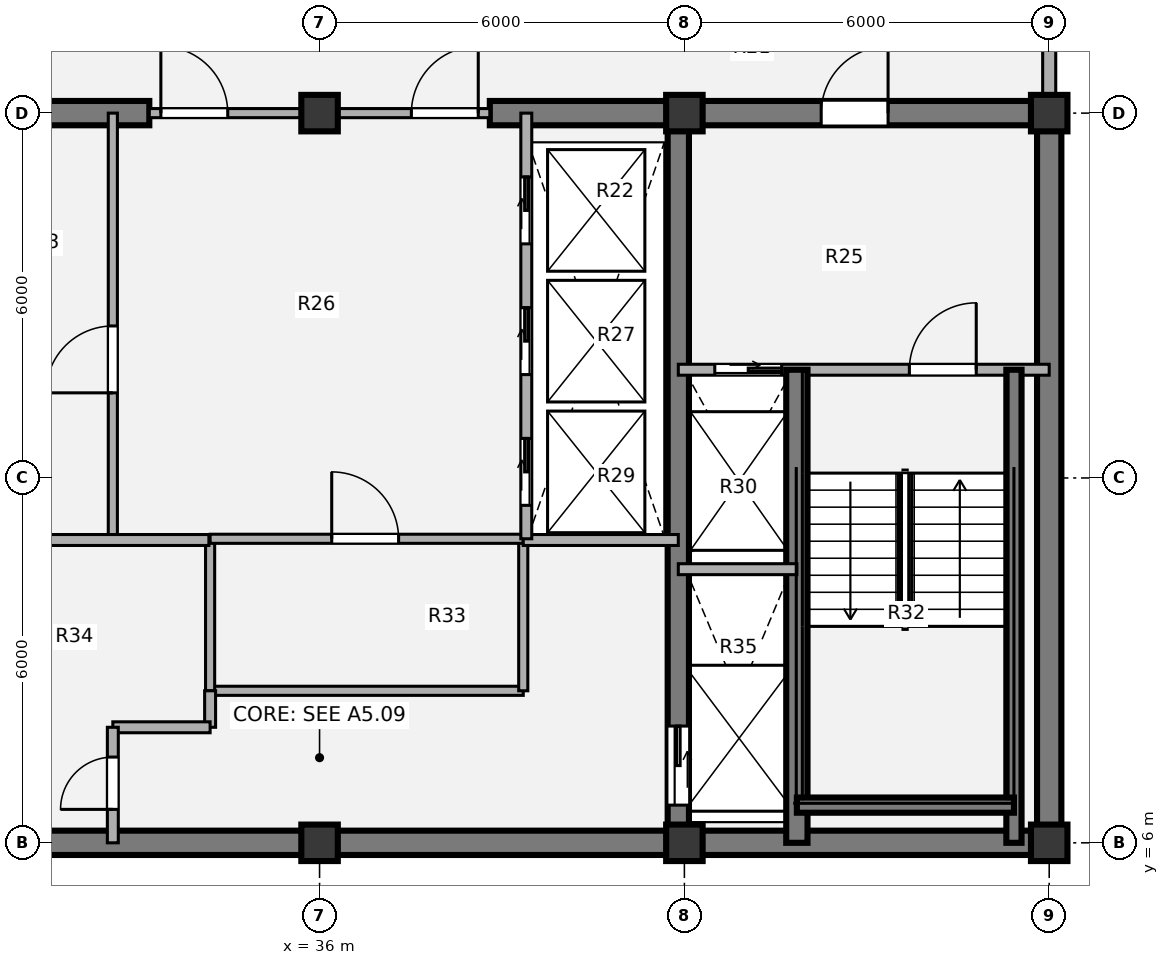
"""IFC4 building model, lengths in metres.
Left out: names, types, materials, properties, quantities, classifications, styles, units other than length and angle.
Written with IfcOpenShell. Run it as: python <this file> out.ifc"""

import sys

from ifc_helpers import new_model, si_unit, direction, frame, frame_2d, origin, origin_2d, place, context, subcontext, project, spatial, rectangle, extrude, source, transform, mapped, element, fill, save


model = new_model("IFC4")
c1 = context("Model", 3, precision=1e-05, world=origin(), true_north=direction((0.0, 1.0)))
c2 = subcontext(c1, "Body", "Model", "MODEL_VIEW")
j1 = project(units=[si_unit("LENGTHUNIT", "METRE"), si_unit("PLANEANGLEUNIT", "RADIAN")], contexts=[c1])
p1 = place(None, origin())
s1 = spatial("IfcSite", under=j1, at=p1, CompositionType="ELEMENT")
p2 = place(p1, origin())
s2 = spatial("IfcBuilding", under=s1, at=p2, CompositionType="ELEMENT")
p3 = place(p2, frame((0.0, 0.0, 275.94)))
s3 = spatial("IfcBuildingStorey", under=s2, at=p3, CompositionType="ELEMENT", Elevation=275.94)
m1 = source(origin(), c2, "Body", "SweptSolid", [
    extrude(rectangle(XDim=0.6, YDim=0.6, at=origin_2d()), origin(), (0.0, 0.0, 1.0), 3.78),
])
for number, where, z_axis, x_axis in (
    (1, (36.0, 6.0, 0.0), (0.0, 0.0, 1.0), (1.0, 0.0, 0.0)),
    (2, (42.0, 6.0, 0.0), (0.0, 0.0, 1.0), (1.0, 0.0, 0.0)),
    (3, (48.0, 6.0, 0.0), (0.0, 0.0, 1.0), (1.0, 0.0, 0.0)),
    (4, (36.0, 18.0, 0.0), (0.0, 0.0, 1.0), (1.0, 0.0, 0.0)),
    (5, (42.0, 18.0, 0.0), (0.0, 0.0, 1.0), (1.0, 0.0, 0.0)),
    (6, (48.0, 18.0, 0.0), (0.0, 0.0, 1.0), (1.0, 0.0, 0.0)),
):
    element("IfcColumn", number, at=place(p3, frame(where, z_axis=z_axis, x_axis=x_axis)), inside=s3, PredefinedType="COLUMN", context=c2, shape_type="MappedRepresentation", body=[
        mapped(m1, transform((0.0, 0.0, 0.0), x_axis=(1.0, 0.0, 0.0), y_axis=(0.0, 1.0, 0.0), z_axis=(0.0, 0.0, 1.0), scale=1.0)),
    ])
p4 = place(p3, frame((48.2, 6.0, 0.0), z_axis=(0.0, 0.0, 1.0), x_axis=(-1.0, 0.0, 0.0)))
e7 = element("IfcWall", 7, at=p4, inside=s3, PredefinedType="SHEAR", context=c2, shape_type="SweptSolid", body=[
    extrude(rectangle(XDim=24.4, YDim=0.4, at=frame_2d((12.2, 0.0))), origin(), (0.0, 0.0, 1.0), 3.78),
])
p5 = place(p3, frame((48.0, 18.0, 0.0), z_axis=(0.0, 0.0, 1.0), x_axis=(0.0, -1.0, 0.0)))
e8 = element("IfcWall", 8, at=p5, inside=s3, PredefinedType="SHEAR", context=c2, shape_type="SweptSolid", body=[
    extrude(rectangle(XDim=12.0, YDim=0.4, at=frame_2d((6.0, 0.0))), origin(), (0.0, 0.0, 1.0), 3.78),
])
p6 = place(p3, frame((23.8, 18.0, 0.0), z_axis=(0.0, 0.0, 1.0), x_axis=(1.0, 0.0, 0.0)))
e9 = element("IfcWall", 9, at=p6, inside=s3, PredefinedType="SHEAR", context=c2, shape_type="SweptSolid", body=[
    extrude(rectangle(XDim=9.4, YDim=0.4, at=frame_2d((4.7, 0.0))), origin(), (0.0, 0.0, 1.0), 3.78),
])
p7 = place(p6, frame((2.95, 0.0, 0.0)))
e10 = element("IfcOpeningElement", 10, at=p7, cuts=e9, PredefinedType="OPENING", context=c2, shape_type="SweptSolid", body=[
    extrude(rectangle(XDim=1.1, YDim=2.1, at=origin_2d()), frame((0.55, 0.21, 1.05), z_axis=(0.0, -1.0, 0.0), x_axis=(1.0, 0.0, 0.0)), (0.0, 0.0, 1.0), 0.42),
])
p8 = place(p3, frame((38.8, 18.0, 0.0), z_axis=(0.0, 0.0, 1.0), x_axis=(1.0, 0.0, 0.0)))
e11 = element("IfcWall", 11, at=p8, inside=s3, PredefinedType="SHEAR", context=c2, shape_type="SweptSolid", body=[
    extrude(rectangle(XDim=9.4, YDim=0.4, at=frame_2d((4.7, 0.0))), origin(), (0.0, 0.0, 1.0), 3.78),
])
p9 = place(p8, frame((5.45, 0.0, 0.0)))
e12 = element("IfcOpeningElement", 12, at=p9, cuts=e11, PredefinedType="OPENING", context=c2, shape_type="SweptSolid", body=[
    extrude(rectangle(XDim=1.1, YDim=2.1, at=origin_2d()), frame((0.55, 0.21, 1.05), z_axis=(0.0, -1.0, 0.0), x_axis=(1.0, 0.0, 0.0)), (0.0, 0.0, 1.0), 0.42),
])
p10 = place(p3, frame((41.9, 18.0, 0.0), z_axis=(0.0, 0.0, 1.0), x_axis=(0.0, -1.0, 0.0)))
e13 = element("IfcWall", 13, at=p10, inside=s3, PredefinedType="SHEAR", context=c2, shape_type="SweptSolid", body=[
    extrude(rectangle(XDim=12.0, YDim=0.35, at=frame_2d((6.0, 0.0))), origin(), (0.0, 0.0, 1.0), 3.78),
])
p11 = place(p10, frame((10.08, 0.0, 0.0)))
e14 = element("IfcOpeningElement", 14, at=p11, cuts=e13, PredefinedType="OPENING", context=c2, shape_type="SweptSolid", body=[
    extrude(rectangle(XDim=1.3, YDim=2.1, at=origin_2d()), frame((0.65, 0.185, 1.05), z_axis=(0.0, -1.0, 0.0), x_axis=(1.0, 0.0, 0.0)), (0.0, 0.0, 1.0), 0.37),
])
p12 = place(p3, frame((48.0, 21.05, 0.0), z_axis=(0.0, 0.0, 1.0), x_axis=(0.0, -1.0, 0.0)))
e15 = element("IfcWall", 15, at=p12, inside=s3, PredefinedType="SOLIDWALL", context=c2, shape_type="SweptSolid", body=[
    extrude(rectangle(XDim=2.77, YDim=0.215, at=frame_2d((1.385, 0.0))), origin(), (0.0, 0.0, 1.0), 2.718),
])
p13 = place(p3, frame((32.6, 11.0, 0.0), z_axis=(0.0, 0.0, 1.0), x_axis=(0.0, 1.0, 0.0)))
e16 = element("IfcWall", 16, at=p13, inside=s3, PredefinedType="PARTITIONING", context=c2, shape_type="SweptSolid", body=[
    extrude(rectangle(XDim=7.0, YDim=0.15, at=frame_2d((3.5, 0.0))), origin(), (0.0, 0.0, 1.0), 3.5),
])
p14 = place(p13, frame((2.4, 0.0, 0.0)))
e17 = element("IfcOpeningElement", 17, at=p14, cuts=e16, PredefinedType="OPENING", context=c2, shape_type="SweptSolid", body=[
    extrude(rectangle(XDim=1.1, YDim=2.1, at=origin_2d()), frame((0.55, 0.085, 1.05), z_axis=(0.0, -1.0, 0.0), x_axis=(1.0, 0.0, 0.0)), (0.0, 0.0, 1.0), 0.17),
])
p15 = place(p3, frame((34.2, 8.5, 0.0), z_axis=(0.0, 0.0, 1.0), x_axis=(1.0, 0.0, 0.0)))
e18 = element("IfcWall", 18, at=p15, inside=s3, PredefinedType="PARTITIONING", context=c2, shape_type="SweptSolid", body=[
    extrude(rectangle(XDim=5.15, YDim=0.15, at=frame_2d((2.575, 0.0))), origin(), (0.0, 0.0, 1.0), 3.5),
])
for number, where, z_axis, x_axis in (
    (19, (34.2, 8.5, 0.0), (0.0, 0.0, 1.0), (0.0, 1.0, 0.0)),
    (20, (39.35, 8.5, 0.0), (0.0, 0.0, 1.0), (0.0, 1.0, 0.0)),
):
    element("IfcWall", number, at=place(p3, frame(where, z_axis=z_axis, x_axis=x_axis)), inside=s3, PredefinedType="PARTITIONING", context=c2, shape_type="SweptSolid", body=[
        extrude(rectangle(XDim=2.5, YDim=0.15, at=frame_2d((1.25, 0.0))), origin(), (0.0, 0.0, 1.0), 3.5),
    ])
p16 = place(p3, frame((34.2, 11.0, 0.0), z_axis=(0.0, 0.0, 1.0), x_axis=(1.0, 0.0, 0.0)))
e21 = element("IfcWall", 21, at=p16, inside=s3, PredefinedType="PARTITIONING", context=c2, shape_type="SweptSolid", body=[
    extrude(rectangle(XDim=5.15, YDim=0.15, at=frame_2d((2.575, 0.0))), origin(), (0.0, 0.0, 1.0), 3.5),
])
p17 = place(p16, frame((2.0, 0.0, 0.0)))
e22 = element("IfcOpeningElement", 22, at=p17, cuts=e21, PredefinedType="OPENING", context=c2, shape_type="SweptSolid", body=[
    extrude(rectangle(XDim=1.1, YDim=2.1, at=origin_2d()), frame((0.55, 0.085, 1.05), z_axis=(0.0, -1.0, 0.0), x_axis=(1.0, 0.0, 0.0)), (0.0, 0.0, 1.0), 0.17),
])
p18 = place(p3, frame((30.1, 10.98, 0.0), z_axis=(0.0, 0.0, 1.0), x_axis=(1.0, 0.0, 0.0)))
e23 = element("IfcWall", 23, at=p18, inside=s3, PredefinedType="PARTITIONING", context=c2, shape_type="SweptSolid", body=[
    extrude(rectangle(XDim=4.08, YDim=0.18, at=frame_2d((2.04, 0.0))), origin(), (0.0, 0.0, 1.0), 3.5),
])
p19 = place(p3, frame((34.2, 7.9, 0.0), z_axis=(0.0, 0.0, 1.0), x_axis=(0.0, 1.0, 0.0)))
e24 = element("IfcWall", 24, at=p19, inside=s3, PredefinedType="PARTITIONING", context=c2, shape_type="SweptSolid", body=[
    extrude(rectangle(XDim=0.6, YDim=0.18, at=frame_2d((0.3, 0.0))), origin(), (0.0, 0.0, 1.0), 3.5),
])
p20 = place(p3, frame((32.6, 7.9, 0.0), z_axis=(0.0, 0.0, 1.0), x_axis=(1.0, 0.0, 0.0)))
e25 = element("IfcWall", 25, at=p20, inside=s3, PredefinedType="PARTITIONING", context=c2, shape_type="SweptSolid", body=[
    extrude(rectangle(XDim=1.6, YDim=0.18, at=frame_2d((0.8, 0.0))), origin(), (0.0, 0.0, 1.0), 3.5),
])
p21 = place(p3, frame((32.6, 6.0, 0.0), z_axis=(0.0, 0.0, 1.0), x_axis=(0.0, 1.0, 0.0)))
e26 = element("IfcWall", 26, at=p21, inside=s3, PredefinedType="PARTITIONING", context=c2, shape_type="SweptSolid", body=[
    extrude(rectangle(XDim=1.9, YDim=0.18, at=frame_2d((0.95, 0.0))), origin(), (0.0, 0.0, 1.0), 3.5),
])
p22 = place(p21, frame((0.55, 0.0, 0.0)))
e27 = element("IfcOpeningElement", 27, at=p22, cuts=e26, PredefinedType="OPENING", context=c2, shape_type="SweptSolid", body=[
    extrude(rectangle(XDim=0.86, YDim=2.1, at=origin_2d()), frame((0.43, 0.1, 1.05), z_axis=(0.0, -1.0, 0.0), x_axis=(1.0, 0.0, 0.0)), (0.0, 0.0, 1.0), 0.2),
])
p23 = place(p3, frame((39.35, 10.98, 0.0), z_axis=(0.0, 0.0, 1.0), x_axis=(1.0, 0.0, 0.0)))
e28 = element("IfcWall", 28, at=p23, inside=s3, PredefinedType="PARTITIONING", context=c2, shape_type="SweptSolid", body=[
    extrude(rectangle(XDim=2.55, YDim=0.18, at=frame_2d((1.275, 0.0))), origin(), (0.0, 0.0, 1.0), 3.5),
])
p24 = place(p3, frame((33.2, 18.0, 0.0), z_axis=(0.0, 0.0, 1.0), x_axis=(1.0, 0.0, 0.0)))
e29 = element("IfcWall", 29, at=p24, inside=s3, PredefinedType="PARTITIONING", context=c2, shape_type="SweptSolid", body=[
    extrude(rectangle(XDim=5.6, YDim=0.15, at=frame_2d((2.8, 0.0))), origin(), (0.0, 0.0, 1.0), 2.515),
])
p25 = place(p24, frame((0.19, 0.0, 0.0)))
e30 = element("IfcOpeningElement", 30, at=p25, cuts=e29, PredefinedType="OPENING", context=c2, shape_type="SweptSolid", body=[
    extrude(rectangle(XDim=1.1, YDim=2.1, at=origin_2d()), frame((0.55, 0.085, 1.05), z_axis=(0.0, -1.0, 0.0), x_axis=(1.0, 0.0, 0.0)), (0.0, 0.0, 1.0), 0.17),
])
p26 = place(p24, frame((4.31, 0.0, 0.0)))
e31 = element("IfcOpeningElement", 31, at=p26, cuts=e29, PredefinedType="OPENING", context=c2, shape_type="SweptSolid", body=[
    extrude(rectangle(XDim=1.1, YDim=2.1, at=origin_2d()), frame((0.55, 0.085, 1.05), z_axis=(0.0, -1.0, 0.0), x_axis=(1.0, 0.0, 0.0)), (0.0, 0.0, 1.0), 0.17),
])
p27 = place(p3, frame((41.9, 13.78, 0.0), z_axis=(0.0, 0.0, 1.0), x_axis=(1.0, 0.0, 0.0)))
e32 = element("IfcWall", 32, at=p27, inside=s3, PredefinedType="PARTITIONING", context=c2, shape_type="SweptSolid", body=[
    extrude(rectangle(XDim=6.1, YDim=0.18, at=frame_2d((3.05, 0.0))), origin(), (0.0, 0.0, 1.0), 3.5),
])
p28 = place(p27, frame((0.6, 0.0, 0.0)))
e33 = element("IfcOpeningElement", 33, at=p28, cuts=e32, PredefinedType="OPENING", context=c2, shape_type="SweptSolid", body=[
    extrude(rectangle(XDim=1.1, YDim=2.1, at=origin_2d()), frame((0.55, 0.1, 1.05), z_axis=(0.0, -1.0, 0.0), x_axis=(1.0, 0.0, 0.0)), (0.0, 0.0, 1.0), 0.2),
])
p29 = place(p27, frame((3.8, 0.0, 0.0)))
e34 = element("IfcOpeningElement", 34, at=p29, cuts=e32, PredefinedType="OPENING", context=c2, shape_type="SweptSolid", body=[
    extrude(rectangle(XDim=1.1, YDim=2.1, at=origin_2d()), frame((0.55, 0.1, 1.05), z_axis=(0.0, -1.0, 0.0), x_axis=(1.0, 0.0, 0.0)), (0.0, 0.0, 1.0), 0.2),
])
p30 = place(p3, frame((43.85, 6.0, 0.0), z_axis=(0.0, 0.0, 1.0), x_axis=(0.0, 1.0, 0.0)))
e35 = element("IfcWall", 35, at=p30, inside=s3, PredefinedType="SHEAR", context=c2, shape_type="SweptSolid", body=[
    extrude(rectangle(XDim=7.78, YDim=0.35, at=frame_2d((3.89, 0.0))), origin(), (0.0, 0.0, 1.0), 3.85),
])
p31 = place(p3, frame((47.42, 6.0, 0.0), z_axis=(0.0, 0.0, 1.0), x_axis=(0.0, 1.0, 0.0)))
e36 = element("IfcWall", 36, at=p31, inside=s3, PredefinedType="SHEAR", context=c2, shape_type="SweptSolid", body=[
    extrude(rectangle(XDim=7.78, YDim=0.25, at=frame_2d((3.89, 0.0))), origin(), (0.0, 0.0, 1.0), 3.85),
])
p32 = place(p3, frame((43.85, 6.62, 0.0), z_axis=(0.0, 0.0, 1.0), x_axis=(1.0, 0.0, 0.0)))
e37 = element("IfcWall", 37, at=p32, inside=s3, PredefinedType="SHEAR", context=c2, shape_type="SweptSolid", body=[
    extrude(rectangle(XDim=3.57, YDim=0.25, at=frame_2d((1.785, 0.0))), origin(), (0.0, 0.0, 1.0), 3.85),
])
p33 = place(p3, frame((41.9, 10.5, 0.0), z_axis=(0.0, 0.0, 1.0), x_axis=(1.0, 0.0, 0.0)))
e38 = element("IfcWall", 38, at=p33, inside=s3, PredefinedType="PARTITIONING", context=c2, shape_type="SweptSolid", body=[
    extrude(rectangle(XDim=1.95, YDim=0.18, at=frame_2d((0.975, 0.0))), origin(), (0.0, 0.0, 1.0), 3.5),
])
p34 = place(p3, frame((39.4, 11.0, 0.0), z_axis=(0.0, 0.0, 1.0), x_axis=(0.0, 1.0, 0.0)))
e39 = element("IfcWall", 39, at=p34, inside=s3, PredefinedType="PARTITIONING", context=c2, shape_type="SweptSolid", body=[
    extrude(rectangle(XDim=7.0, YDim=0.18, at=frame_2d((3.5, 0.0))), origin(), (0.0, 0.0, 1.0), 3.5),
])
p35 = place(p34, frame((0.55, 0.0, 0.0)))
e40 = element("IfcOpeningElement", 40, at=p35, cuts=e39, PredefinedType="OPENING", context=c2, shape_type="SweptSolid", body=[
    extrude(rectangle(XDim=1.1, YDim=2.1, at=origin_2d()), frame((0.55, 0.1, 1.05), z_axis=(0.0, -1.0, 0.0), x_axis=(1.0, 0.0, 0.0)), (0.0, 0.0, 1.0), 0.2),
])
p36 = place(p34, frame((2.7, 0.0, 0.0)))
e41 = element("IfcOpeningElement", 41, at=p36, cuts=e39, PredefinedType="OPENING", context=c2, shape_type="SweptSolid", body=[
    extrude(rectangle(XDim=1.1, YDim=2.1, at=origin_2d()), frame((0.55, 0.1, 1.05), z_axis=(0.0, -1.0, 0.0), x_axis=(1.0, 0.0, 0.0)), (0.0, 0.0, 1.0), 0.2),
])
p37 = place(p34, frame((4.85, 0.0, 0.0)))
e42 = element("IfcOpeningElement", 42, at=p37, cuts=e39, PredefinedType="OPENING", context=c2, shape_type="SweptSolid", body=[
    extrude(rectangle(XDim=1.1, YDim=2.1, at=origin_2d()), frame((0.55, 0.1, 1.05), z_axis=(0.0, -1.0, 0.0), x_axis=(1.0, 0.0, 0.0)), (0.0, 0.0, 1.0), 0.2),
])
m2 = source(origin(), c2, "Body", "SweptSolid", [
    extrude(rectangle(XDim=1.1, YDim=2.1, at=origin_2d()), frame((0.55, 0.025, 1.05), z_axis=(0.0, -1.0, 0.0), x_axis=(1.0, 0.0, 0.0)), (0.0, 0.0, 1.0), 0.05),
])
p38 = place(p14, origin())
e43 = element("IfcDoor", 43, at=p38, inside=s3, OperationType="SINGLE_SWING_LEFT", PredefinedType="DOOR", context=c2, shape_type="MappedRepresentation", body=[
    mapped(m2, transform((0.0, 0.0, 0.0), x_axis=(1.0, 0.0, 0.0), y_axis=(0.0, 1.0, 0.0), z_axis=(0.0, 0.0, 1.0), scale=1.0)),
])
fill(e17, e43)
p39 = place(p17, origin())
e44 = element("IfcDoor", 44, at=p39, inside=s3, OperationType="SINGLE_SWING_LEFT", PredefinedType="DOOR", context=c2, shape_type="MappedRepresentation", body=[
    mapped(m2, transform((0.0, 0.0, 0.0), x_axis=(1.0, 0.0, 0.0), y_axis=(0.0, 1.0, 0.0), z_axis=(0.0, 0.0, 1.0), scale=1.0)),
])
fill(e22, e44)
m3 = source(origin(), c2, "Body", "SweptSolid", [
    extrude(rectangle(XDim=0.86, YDim=2.1, at=origin_2d()), frame((0.43, 0.025, 1.05), z_axis=(0.0, -1.0, 0.0), x_axis=(1.0, 0.0, 0.0)), (0.0, 0.0, 1.0), 0.05),
])
p40 = place(p22, origin())
e45 = element("IfcDoor", 45, at=p40, inside=s3, OperationType="SINGLE_SWING_LEFT", PredefinedType="DOOR", context=c2, shape_type="MappedRepresentation", body=[
    mapped(m3, transform((0.0, 0.0, 0.0), x_axis=(1.0, 0.0, 0.0), y_axis=(0.0, 1.0, 0.0), z_axis=(0.0, 0.0, 1.0), scale=1.0)),
])
fill(e27, e45)
m4 = source(origin(), c2, "Body", "SweptSolid", [
    extrude(rectangle(XDim=1.1, YDim=2.1, at=origin_2d()), frame((0.55, 0.025, 1.05), z_axis=(0.0, -1.0, 0.0), x_axis=(1.0, 0.0, 0.0)), (0.0, 0.0, 1.0), 0.05),
])
p41 = place(p25, origin())
e46 = element("IfcDoor", 46, at=p41, inside=s3, OperationType="SINGLE_SWING_LEFT", PredefinedType="DOOR", context=c2, shape_type="MappedRepresentation", body=[
    mapped(m4, transform((0.0, 0.0, 0.0), x_axis=(1.0, 0.0, 0.0), y_axis=(0.0, 1.0, 0.0), z_axis=(0.0, 0.0, 1.0), scale=1.0)),
])
fill(e30, e46)
p42 = place(p26, origin())
e47 = element("IfcDoor", 47, at=p42, inside=s3, OperationType="SINGLE_SWING_RIGHT", PredefinedType="DOOR", context=c2, shape_type="MappedRepresentation", body=[
    mapped(m4, transform((0.0, 0.0, 0.0), x_axis=(1.0, 0.0, 0.0), y_axis=(0.0, 1.0, 0.0), z_axis=(0.0, 0.0, 1.0), scale=1.0)),
])
fill(e31, e47)
m5 = source(origin(), c2, "Body", "SweptSolid", [
    extrude(rectangle(XDim=1.1, YDim=2.1, at=origin_2d()), frame((0.55, 0.025, 1.05), z_axis=(0.0, -1.0, 0.0), x_axis=(1.0, 0.0, 0.0)), (0.0, 0.0, 1.0), 0.05),
])
p43 = place(p28, origin())
e48 = element("IfcDoor", 48, at=p43, inside=s3, OperationType="SLIDING_TO_RIGHT", PredefinedType="DOOR", context=c2, shape_type="MappedRepresentation", body=[
    mapped(m5, transform((0.0, 0.0, 0.0), x_axis=(1.0, 0.0, 0.0), y_axis=(0.0, 1.0, 0.0), z_axis=(0.0, 0.0, 1.0), scale=1.0)),
])
fill(e33, e48)
m6 = source(origin(), c2, "Body", "SweptSolid", [
    extrude(rectangle(XDim=1.1, YDim=2.1, at=origin_2d()), frame((0.55, 0.025, 1.05), z_axis=(0.0, -1.0, 0.0), x_axis=(1.0, 0.0, 0.0)), (0.0, 0.0, 1.0), 0.05),
])
p44 = place(p29, origin())
e49 = element("IfcDoor", 49, at=p44, inside=s3, OperationType="SINGLE_SWING_RIGHT", PredefinedType="DOOR", context=c2, shape_type="MappedRepresentation", body=[
    mapped(m6, transform((0.0, 0.0, 0.0), x_axis=(1.0, 0.0, 0.0), y_axis=(0.0, 1.0, 0.0), z_axis=(0.0, 0.0, 1.0), scale=1.0)),
])
fill(e34, e49)
m7 = source(origin(), c2, "Body", "SweptSolid", [
    extrude(rectangle(XDim=1.3, YDim=2.1, at=origin_2d()), frame((0.65, 0.025, 1.05), z_axis=(0.0, -1.0, 0.0), x_axis=(1.0, 0.0, 0.0)), (0.0, 0.0, 1.0), 0.05),
])
p45 = place(p11, origin())
e50 = element("IfcDoor", 50, at=p45, inside=s3, OperationType="SLIDING_TO_LEFT", PredefinedType="DOOR", context=c2, shape_type="MappedRepresentation", body=[
    mapped(m7, transform((0.0, 0.0, 0.0), x_axis=(1.0, 0.0, 0.0), y_axis=(0.0, 1.0, 0.0), z_axis=(0.0, 0.0, 1.0), scale=1.0)),
])
fill(e14, e50)
p46 = place(p9, origin())
e51 = element("IfcDoor", 51, at=p46, inside=s3, OperationType="SINGLE_SWING_RIGHT", PredefinedType="DOOR", context=c2, shape_type="MappedRepresentation", body=[
    mapped(m4, transform((0.0, 0.0, 0.0), x_axis=(1.0, 0.0, 0.0), y_axis=(0.0, 1.0, 0.0), z_axis=(0.0, 0.0, 1.0), scale=1.0)),
])
fill(e12, e51)
p47 = place(p35, origin())
e52 = element("IfcDoor", 52, at=p47, inside=s3, OperationType="SLIDING_TO_RIGHT", PredefinedType="DOOR", context=c2, shape_type="MappedRepresentation", body=[
    mapped(m5, transform((0.0, 0.0, 0.0), x_axis=(1.0, 0.0, 0.0), y_axis=(0.0, 1.0, 0.0), z_axis=(0.0, 0.0, 1.0), scale=1.0)),
])
fill(e40, e52)
p48 = place(p36, origin())
e53 = element("IfcDoor", 53, at=p48, inside=s3, OperationType="SLIDING_TO_RIGHT", PredefinedType="DOOR", context=c2, shape_type="MappedRepresentation", body=[
    mapped(m5, transform((0.0, 0.0, 0.0), x_axis=(1.0, 0.0, 0.0), y_axis=(0.0, 1.0, 0.0), z_axis=(0.0, 0.0, 1.0), scale=1.0)),
])
fill(e41, e53)
p49 = place(p37, origin())
e54 = element("IfcDoor", 54, at=p49, inside=s3, OperationType="SLIDING_TO_RIGHT", PredefinedType="DOOR", context=c2, shape_type="MappedRepresentation", body=[
    mapped(m5, transform((0.0, 0.0, 0.0), x_axis=(1.0, 0.0, 0.0), y_axis=(0.0, 1.0, 0.0), z_axis=(0.0, 0.0, 1.0), scale=1.0)),
])
fill(e42, e54)
save(model, sys.argv[1])
